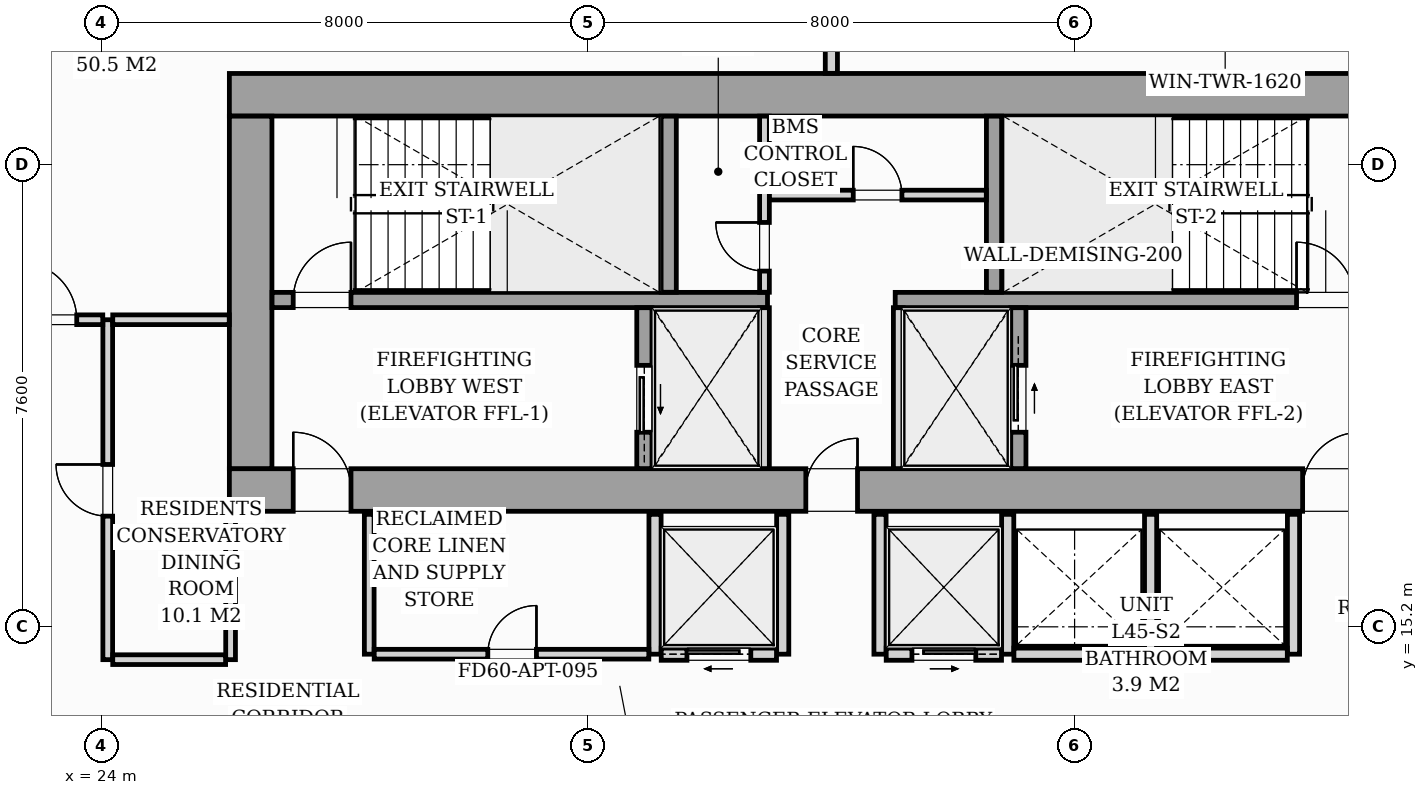
"""IFC4 building model, lengths in metres.
Left out: names, types, materials, properties, quantities, classifications, styles, units other than length and angle.
Written with IfcOpenShell. Run it as: python <this file> out.ifc"""

import sys

from ifc_helpers import new_model, si_unit, direction, frame, frame_2d, origin, origin_2d, place, context, subcontext, project, spatial, rectangle, i_section, extrude, source, transform, mapped, element, fill, save


model = new_model("IFC4")
c1 = context("Model", 3, precision=1e-05, world=origin(), true_north=direction((0.0, 1.0)))
c2 = subcontext(c1, "Body", "Model", "MODEL_VIEW")
j1 = project(units=[si_unit("LENGTHUNIT", "METRE"), si_unit("PLANEANGLEUNIT", "RADIAN")], contexts=[c1])
p1 = place(None, origin())
s1 = spatial("IfcSite", under=j1, at=p1, CompositionType="ELEMENT")
p2 = place(p1, origin())
s2 = spatial("IfcBuilding", under=s1, at=p2, CompositionType="ELEMENT")
p3 = place(p2, frame((0.0, 0.0, 156.6)))
s3 = spatial("IfcBuildingStorey", under=s2, at=p3, CompositionType="ELEMENT", Elevation=156.6)
m1 = source(origin(), c2, "Body", "SweptSolid", [
    extrude(i_section(OverallWidth=0.421, OverallDepth=0.465, WebThickness=0.045, FlangeThickness=0.073, FilletRadius=0.018, at=origin_2d()), origin(), (0.0, 0.0, 1.0), 3.196),
])
for number, where, z_axis, x_axis in (
    (1, (26.4, 17.4, 0.002), (0.0, 0.0, 1.0), (1.0, 0.0, 0.0)),
    (2, (33.12, 17.4, 0.002), (0.0, 0.0, 1.0), (1.0, 0.0, 0.0)),
    (3, (38.88, 17.4, 0.002), (0.0, 0.0, 1.0), (1.0, 0.0, 0.0)),
    (4, (26.4, 24.0, 0.002), (0.0, 0.0, 1.0), (1.0, 0.0, 0.0)),
    (5, (33.12, 24.0, 0.002), (0.0, 0.0, 1.0), (1.0, 0.0, 0.0)),
    (6, (38.88, 24.0, 0.002), (0.0, 0.0, 1.0), (1.0, 0.0, 0.0)),
):
    element("IfcColumn", number, at=place(p3, frame(where, z_axis=z_axis, x_axis=x_axis)), inside=s3, PredefinedType="PILASTER", context=c2, shape_type="MappedRepresentation", body=[
        mapped(m1, transform((0.0, 0.0, 0.0), scale=1.0)),
    ])
p4 = place(p3, frame((40.983, 25.727, 0.0), z_axis=(0.0, 0.0, 1.0), x_axis=(0.995395844771, -0.095849424686, 0.0)))
e7 = element("IfcWall", 7, at=p4, inside=s3, PredefinedType="STANDARD", context=c2, shape_type="SweptSolid", body=[
    extrude(rectangle(XDim=17.01, YDim=0.26, at=frame_2d((8.505, 0.0))), origin(), (0.0, 0.0, 1.0), 2.94),
])
p5 = place(p4, frame((11.56, 0.0, 0.0)))
e8 = element("IfcOpeningElement", 8, at=p5, cuts=e7, PredefinedType="OPENING", context=c2, shape_type="SweptSolid", body=[
    extrude(rectangle(XDim=1.8, YDim=2.06, at=frame_2d((0.9, 1.03))), frame((0.0, 0.14, 0.0), z_axis=(0.0, -1.0, 0.0), x_axis=(1.0, 0.0, 0.0)), (0.0, 0.0, 1.0), 0.28),
])
p6 = place(p4, frame((0.7, 0.0, 0.65)))
e9 = element("IfcOpeningElement", 9, at=p6, cuts=e7, PredefinedType="OPENING", context=c2, shape_type="SweptSolid", body=[
    extrude(rectangle(XDim=1.6, YDim=1.5, at=frame_2d((0.8, 0.75))), frame((0.0, 0.14, 0.0), z_axis=(0.0, -1.0, 0.0), x_axis=(1.0, 0.0, 0.0)), (0.0, 0.0, 1.0), 0.28),
])
p7 = place(p3, frame((26.1, 17.45, 0.0), z_axis=(0.0, 0.0, 1.0), x_axis=(1.0, 0.0, 0.0)))
e10 = element("IfcWall", 10, at=p7, inside=s3, PredefinedType="SHEAR", context=c2, shape_type="SweptSolid", body=[
    extrude(rectangle(XDim=19.8, YDim=0.7, at=frame_2d((9.9, 0.0))), origin(), (0.0, 0.0, 1.0), 3.2),
])
p8 = place(p7, frame((1.05, 0.0, 0.0)))
e11 = element("IfcOpeningElement", 11, at=p8, cuts=e10, PredefinedType="OPENING", context=c2, shape_type="SweptSolid", body=[
    extrude(rectangle(XDim=0.95, YDim=2.06, at=frame_2d((0.475, 1.03))), frame((0.0, 0.36, 0.0), z_axis=(0.0, -1.0, 0.0), x_axis=(1.0, 0.0, 0.0)), (0.0, 0.0, 1.0), 0.72),
])
p9 = place(p7, frame((9.48, 0.0, 0.0)))
e12 = element("IfcOpeningElement", 12, at=p9, cuts=e10, PredefinedType="OPENING", context=c2, shape_type="SweptSolid", body=[
    extrude(rectangle(XDim=0.85, YDim=2.0, at=frame_2d((0.425, 1.0))), frame((0.0, 0.36, 0.0), z_axis=(0.0, -1.0, 0.0), x_axis=(1.0, 0.0, 0.0)), (0.0, 0.0, 1.0), 0.72),
])
p10 = place(p7, frame((17.65, 0.0, 0.0)))
e13 = element("IfcOpeningElement", 13, at=p10, cuts=e10, PredefinedType="OPENING", context=c2, shape_type="SweptSolid", body=[
    extrude(rectangle(XDim=0.95, YDim=2.06, at=frame_2d((0.475, 1.03))), frame((0.0, 0.36, 0.0), z_axis=(0.0, -1.0, 0.0), x_axis=(1.0, 0.0, 0.0)), (0.0, 0.0, 1.0), 0.72),
])
p11 = place(p3, frame((26.1, 23.95, 0.0), z_axis=(0.0, 0.0, 1.0), x_axis=(1.0, 0.0, 0.0)))
e14 = element("IfcWall", 14, at=p11, inside=s3, PredefinedType="SHEAR", context=c2, shape_type="SweptSolid", body=[
    extrude(rectangle(XDim=19.8, YDim=0.7, at=frame_2d((9.9, 0.0))), origin(), (0.0, 0.0, 1.0), 3.2),
])
p12 = place(p3, frame((26.45, 17.802, 0.0), z_axis=(0.0, 0.0, 1.0), x_axis=(0.0, 1.0, 0.0)))
e15 = element("IfcWall", 15, at=p12, inside=s3, PredefinedType="SHEAR", context=c2, shape_type="SweptSolid", body=[
    extrude(rectangle(XDim=5.796, YDim=0.7, at=frame_2d((2.898, 0.0))), origin(), (0.0, 0.0, 1.0), 3.2),
])
p13 = place(p3, frame((26.802, 20.575, 0.0), z_axis=(0.0, 0.0, 1.0), x_axis=(1.0, 0.0, 0.0)))
e16 = element("IfcWall", 16, at=p13, inside=s3, PredefinedType="SOLIDWALL", context=c2, shape_type="SweptSolid", body=[
    extrude(rectangle(XDim=8.148, YDim=0.25, at=frame_2d((4.074, 0.0))), origin(), (0.0, 0.0, 1.0), 3.2),
])
p14 = place(p13, frame((0.348, 0.0, 0.0)))
e17 = element("IfcOpeningElement", 17, at=p14, cuts=e16, PredefinedType="OPENING", context=c2, shape_type="SweptSolid", body=[
    extrude(rectangle(XDim=0.95, YDim=2.06, at=frame_2d((0.475, 1.03))), frame((0.0, 0.135, 0.0), z_axis=(0.0, -1.0, 0.0), x_axis=(1.0, 0.0, 0.0)), (0.0, 0.0, 1.0), 0.27),
])
p15 = place(p3, frame((37.05, 20.575, 0.0), z_axis=(0.0, 0.0, 1.0), x_axis=(1.0, 0.0, 0.0)))
e18 = element("IfcWall", 18, at=p15, inside=s3, PredefinedType="SOLIDWALL", context=c2, shape_type="SweptSolid", body=[
    extrude(rectangle(XDim=8.148, YDim=0.25, at=frame_2d((4.074, 0.0))), origin(), (0.0, 0.0, 1.0), 3.2),
])
p16 = place(p15, frame((6.6, 0.0, 0.0)))
e19 = element("IfcOpeningElement", 19, at=p16, cuts=e18, PredefinedType="OPENING", context=c2, shape_type="SweptSolid", body=[
    extrude(rectangle(XDim=0.95, YDim=2.06, at=frame_2d((0.475, 1.03))), frame((0.0, 0.135, 0.0), z_axis=(0.0, -1.0, 0.0), x_axis=(1.0, 0.0, 0.0)), (0.0, 0.0, 1.0), 0.27),
])
for number, where, z_axis, x_axis in (
    (20, (33.325, 20.702, 0.0), (0.0, 0.0, 1.0), (0.0, 1.0, 0.0)),
    (21, (38.675, 20.702, 0.0), (0.0, 0.0, 1.0), (0.0, 1.0, 0.0)),
):
    element("IfcWall", number, at=place(p3, frame(where, z_axis=z_axis, x_axis=x_axis)), inside=s3, PredefinedType="SOLIDWALL", context=c2, shape_type="SweptSolid", body=[
        extrude(rectangle(XDim=2.896, YDim=0.25, at=frame_2d((1.448, 0.0))), origin(), (0.0, 0.0, 1.0), 3.2),
    ])
p17 = place(p3, frame((32.925, 17.802, 0.0), z_axis=(0.0, 0.0, 1.0), x_axis=(0.0, 1.0, 0.0)))
e22 = element("IfcWall", 22, at=p17, inside=s3, PredefinedType="SOLIDWALL", context=c2, shape_type="SweptSolid", body=[
    extrude(rectangle(XDim=2.646, YDim=0.25, at=frame_2d((1.323, 0.0))), origin(), (0.0, 0.0, 1.0), 3.2),
])
p18 = place(p17, frame((0.598, 0.0, 0.0)))
e23 = element("IfcOpeningElement", 23, at=p18, cuts=e22, PredefinedType="OPENING", context=c2, shape_type="SweptSolid", body=[
    extrude(rectangle(XDim=1.1, YDim=2.08, at=frame_2d((0.55, 1.04))), frame((0.0, 0.135, 0.0), z_axis=(0.0, -1.0, 0.0), x_axis=(1.0, 0.0, 0.0)), (0.0, 0.0, 1.0), 0.27),
])
for number, where, z_axis, x_axis in (
    (24, (34.9, 17.802, 0.0), (0.0, 0.0, 1.0), (0.0, 1.0, 0.0)),
    (25, (37.1, 17.802, 0.0), (0.0, 0.0, 1.0), (0.0, 1.0, 0.0)),
):
    element("IfcWall", number, at=place(p3, frame(where, z_axis=z_axis, x_axis=x_axis)), inside=s3, PredefinedType="PARTITIONING", context=c2, shape_type="SweptSolid", body=[
        extrude(rectangle(XDim=2.646, YDim=0.16, at=frame_2d((1.323, 0.0))), origin(), (0.0, 0.0, 1.0), 2.94),
    ])
p19 = place(p3, frame((39.075, 17.802, 0.0), z_axis=(0.0, 0.0, 1.0), x_axis=(0.0, 1.0, 0.0)))
e26 = element("IfcWall", 26, at=p19, inside=s3, PredefinedType="SOLIDWALL", context=c2, shape_type="SweptSolid", body=[
    extrude(rectangle(XDim=2.646, YDim=0.25, at=frame_2d((1.323, 0.0))), origin(), (0.0, 0.0, 1.0), 3.2),
])
p20 = place(p19, frame((0.598, 0.0, 0.0)))
e27 = element("IfcOpeningElement", 27, at=p20, cuts=e26, PredefinedType="OPENING", context=c2, shape_type="SweptSolid", body=[
    extrude(rectangle(XDim=1.1, YDim=2.08, at=frame_2d((0.55, 1.04))), frame((0.0, 0.135, 0.0), z_axis=(0.0, -1.0, 0.0), x_axis=(1.0, 0.0, 0.0)), (0.0, 0.0, 1.0), 0.27),
])
p21 = place(p3, frame((34.9, 20.702, 0.0), z_axis=(0.0, 0.0, 1.0), x_axis=(0.0, 1.0, 0.0)))
e28 = element("IfcWall", 28, at=p21, inside=s3, PredefinedType="PARTITIONING", context=c2, shape_type="SweptSolid", body=[
    extrude(rectangle(XDim=2.896, YDim=0.16, at=frame_2d((1.448, 0.0))), origin(), (0.0, 0.0, 1.0), 2.94),
])
p22 = place(p21, frame((0.348, 0.0, 0.0)))
e29 = element("IfcOpeningElement", 29, at=p22, cuts=e28, PredefinedType="OPENING", context=c2, shape_type="SweptSolid", body=[
    extrude(rectangle(XDim=0.8, YDim=2.05, at=frame_2d((0.4, 1.025))), frame((0.0, 0.09, 0.0), z_axis=(0.0, -1.0, 0.0), x_axis=(1.0, 0.0, 0.0)), (0.0, 0.0, 1.0), 0.18),
])
p23 = place(p3, frame((34.982, 22.3, 0.0), z_axis=(0.0, 0.0, 1.0), x_axis=(1.0, 0.0, 0.0)))
e30 = element("IfcWall", 30, at=p23, inside=s3, PredefinedType="PARTITIONING", context=c2, shape_type="SweptSolid", body=[
    extrude(rectangle(XDim=3.566, YDim=0.16, at=frame_2d((1.783, 0.0))), origin(), (0.0, 0.0, 1.0), 2.94),
])
p24 = place(p23, frame((1.378, 0.0, 0.0)))
e31 = element("IfcOpeningElement", 31, at=p24, cuts=e30, PredefinedType="OPENING", context=c2, shape_type="SweptSolid", body=[
    extrude(rectangle(XDim=0.8, YDim=2.05, at=frame_2d((0.4, 1.025))), frame((0.0, 0.09, 0.0), z_axis=(0.0, -1.0, 0.0), x_axis=(1.0, 0.0, 0.0)), (0.0, 0.0, 1.0), 0.18),
])
p25 = place(p3, frame((28.4, 14.75, 0.0), z_axis=(0.0, 0.0, 1.0), x_axis=(0.0, 1.0, 0.0)))
e32 = element("IfcWall", 32, at=p25, inside=s3, PredefinedType="PARTITIONING", context=c2, shape_type="SweptSolid", body=[
    extrude(rectangle(XDim=2.3, YDim=0.16, at=frame_2d((1.15, 0.0))), origin(), (0.0, 0.0, 1.0), 2.94),
])
p26 = place(p3, frame((33.1, 14.75, 0.0), z_axis=(0.0, 0.0, 1.0), x_axis=(0.0, 1.0, 0.0)))
e33 = element("IfcWall", 33, at=p26, inside=s3, PredefinedType="PARTITIONING", context=c2, shape_type="SweptSolid", body=[
    extrude(rectangle(XDim=2.3, YDim=0.2, at=frame_2d((1.15, 0.0))), origin(), (0.0, 0.0, 1.0), 2.94),
])
p27 = place(p3, frame((28.482, 14.75, 0.0), z_axis=(0.0, 0.0, 1.0), x_axis=(1.0, 0.0, 0.0)))
e34 = element("IfcWall", 34, at=p27, inside=s3, PredefinedType="PARTITIONING", context=c2, shape_type="SweptSolid", body=[
    extrude(rectangle(XDim=4.516, YDim=0.16, at=frame_2d((2.258, 0.0))), origin(), (0.0, 0.0, 1.0), 2.94),
])
p28 = place(p27, frame((1.868, 0.0, 0.0)))
e35 = element("IfcOpeningElement", 35, at=p28, cuts=e34, PredefinedType="OPENING", context=c2, shape_type="SweptSolid", body=[
    extrude(rectangle(XDim=0.8, YDim=2.05, at=frame_2d((0.4, 1.025))), frame((0.0, 0.09, 0.0), z_axis=(0.0, -1.0, 0.0), x_axis=(1.0, 0.0, 0.0)), (0.0, 0.0, 1.0), 0.18),
])
p29 = place(p3, frame((35.2, 14.75, 0.0), z_axis=(0.0, 0.0, 1.0), x_axis=(0.0, 1.0, 0.0)))
e36 = element("IfcWall", 36, at=p29, inside=s3, PredefinedType="PARTITIONING", context=c2, shape_type="SweptSolid", body=[
    extrude(rectangle(XDim=2.3, YDim=0.2, at=frame_2d((1.15, 0.0))), origin(), (0.0, 0.0, 1.0), 2.94),
])
p30 = place(p3, frame((33.202, 14.75, 0.0), z_axis=(0.0, 0.0, 1.0), x_axis=(1.0, 0.0, 0.0)))
e37 = element("IfcWall", 37, at=p30, inside=s3, PredefinedType="PARTITIONING", context=c2, shape_type="SweptSolid", body=[
    extrude(rectangle(XDim=1.896, YDim=0.2, at=frame_2d((0.948, 0.0))), origin(), (0.0, 0.0, 1.0), 2.94),
])
p31 = place(p30, frame((0.423, 0.0, 0.0)))
e38 = element("IfcOpeningElement", 38, at=p31, cuts=e37, PredefinedType="OPENING", context=c2, shape_type="SweptSolid", body=[
    extrude(rectangle(XDim=1.05, YDim=2.08, at=frame_2d((0.525, 1.04))), frame((0.0, 0.11, 0.0), z_axis=(0.0, -1.0, 0.0), x_axis=(1.0, 0.0, 0.0)), (0.0, 0.0, 1.0), 0.22),
])
for number, where, z_axis, x_axis in (
    (39, (36.8, 14.75, 0.0), (0.0, 0.0, 1.0), (0.0, 1.0, 0.0)),
    (40, (38.9, 14.75, 0.0), (0.0, 0.0, 1.0), (0.0, 1.0, 0.0)),
):
    element("IfcWall", number, at=place(p3, frame(where, z_axis=z_axis, x_axis=x_axis)), inside=s3, PredefinedType="PARTITIONING", context=c2, shape_type="SweptSolid", body=[
        extrude(rectangle(XDim=2.3, YDim=0.2, at=frame_2d((1.15, 0.0))), origin(), (0.0, 0.0, 1.0), 2.94),
    ])
p32 = place(p3, frame((36.902, 14.75, 0.0), z_axis=(0.0, 0.0, 1.0), x_axis=(1.0, 0.0, 0.0)))
e41 = element("IfcWall", 41, at=p32, inside=s3, PredefinedType="PARTITIONING", context=c2, shape_type="SweptSolid", body=[
    extrude(rectangle(XDim=1.896, YDim=0.2, at=frame_2d((0.948, 0.0))), origin(), (0.0, 0.0, 1.0), 2.94),
])
p33 = place(p32, frame((0.423, 0.0, 0.0)))
e42 = element("IfcOpeningElement", 42, at=p33, cuts=e41, PredefinedType="OPENING", context=c2, shape_type="SweptSolid", body=[
    extrude(rectangle(XDim=1.05, YDim=2.08, at=frame_2d((0.525, 1.04))), frame((0.0, 0.11, 0.0), z_axis=(0.0, -1.0, 0.0), x_axis=(1.0, 0.0, 0.0)), (0.0, 0.0, 1.0), 0.22),
])
for number, where, z_axis, x_axis in (
    (43, (41.25, 14.75, 0.0), (0.0, 0.0, 1.0), (0.0, 1.0, 0.0)),
    (44, (43.6, 14.75, 0.0), (0.0, 0.0, 1.0), (0.0, 1.0, 0.0)),
):
    element("IfcWall", number, at=place(p3, frame(where, z_axis=z_axis, x_axis=x_axis)), inside=s3, PredefinedType="PARTITIONING", context=c2, shape_type="SweptSolid", body=[
        extrude(rectangle(XDim=2.3, YDim=0.2, at=frame_2d((1.15, 0.0))), origin(), (0.0, 0.0, 1.0), 2.94),
    ])
for number, where, z_axis, x_axis in (
    (45, (39.002, 14.75, 0.0), (0.0, 0.0, 1.0), (1.0, 0.0, 0.0)),
    (46, (41.352, 14.75, 0.0), (0.0, 0.0, 1.0), (1.0, 0.0, 0.0)),
):
    element("IfcWall", number, at=place(p3, frame(where, z_axis=z_axis, x_axis=x_axis)), inside=s3, PredefinedType="PARTITIONING", context=c2, shape_type="SweptSolid", body=[
        extrude(rectangle(XDim=2.146, YDim=0.2, at=frame_2d((1.073, 0.0))), origin(), (0.0, 0.0, 1.0), 2.94),
    ])
p34 = place(p3, frame((36.0, 24.302, 0.0), z_axis=(0.0, 0.0, 1.0), x_axis=(0.0, 1.0, 0.0)))
e47 = element("IfcWall", 47, at=p34, inside=s3, PredefinedType="PARTITIONING", context=c2, shape_type="SweptSolid", body=[
    extrude(rectangle(XDim=1.955, YDim=0.2, at=frame_2d((0.978, 0.0))), origin(), (0.0, 0.0, 1.0), 2.94),
])
p35 = place(p3, frame((24.1, 14.66, 0.0), z_axis=(0.0, 0.0, 1.0), x_axis=(0.0, 1.0, 0.0)))
e48 = element("IfcWall", 48, at=p35, inside=s3, PredefinedType="PARTITIONING", context=c2, shape_type="SweptSolid", body=[
    extrude(rectangle(XDim=5.59, YDim=0.16, at=frame_2d((2.795, 0.0))), origin(), (0.0, 0.0, 1.0), 2.94),
])
p36 = place(p35, frame((2.36, 0.0, 0.0)))
e49 = element("IfcOpeningElement", 49, at=p36, cuts=e48, PredefinedType="OPENING", context=c2, shape_type="SweptSolid", body=[
    extrude(rectangle(XDim=0.85, YDim=2.0, at=frame_2d((0.425, 1.0))), frame((0.0, 0.09, 0.0), z_axis=(0.0, -1.0, 0.0), x_axis=(1.0, 0.0, 0.0)), (0.0, 0.0, 1.0), 0.18),
])
p37 = place(p3, frame((22.132, 20.25, 0.0), z_axis=(0.0, 0.0, 1.0), x_axis=(1.0, 0.0, 0.0)))
e50 = element("IfcWall", 50, at=p37, inside=s3, PredefinedType="PARTITIONING", context=c2, shape_type="SweptSolid", body=[
    extrude(rectangle(XDim=1.886, YDim=0.16, at=frame_2d((0.943, 0.0))), origin(), (0.0, 0.0, 1.0), 2.94),
])
p38 = place(p37, frame((0.508, 0.0, 0.0)))
e51 = element("IfcOpeningElement", 51, at=p38, cuts=e50, PredefinedType="OPENING", context=c2, shape_type="SweptSolid", body=[
    extrude(rectangle(XDim=0.95, YDim=2.06, at=frame_2d((0.475, 1.03))), frame((0.0, 0.09, 0.0), z_axis=(0.0, -1.0, 0.0), x_axis=(1.0, 0.0, 0.0)), (0.0, 0.0, 1.0), 0.18),
])
p39 = place(p3, frame((24.182, 20.25, 0.0), z_axis=(0.0, 0.0, 1.0), x_axis=(1.0, 0.0, 0.0)))
e52 = element("IfcWall", 52, at=p39, inside=s3, PredefinedType="PARTITIONING", context=c2, shape_type="SweptSolid", body=[
    extrude(rectangle(XDim=1.916, YDim=0.16, at=frame_2d((0.958, 0.0))), origin(), (0.0, 0.0, 1.0), 2.94),
])
p40 = place(p3, frame((26.12, 14.66, 0.0), z_axis=(0.0, 0.0, 1.0), x_axis=(0.0, 1.0, 0.0)))
e53 = element("IfcWall", 53, at=p40, inside=s3, PredefinedType="PARTITIONING", context=c2, shape_type="SweptSolid", body=[
    extrude(rectangle(XDim=2.438, YDim=0.16, at=frame_2d((1.219, 0.0))), origin(), (0.0, 0.0, 1.0), 2.94),
])
p41 = place(p3, frame((24.182, 14.66, 0.0), z_axis=(0.0, 0.0, 1.0), x_axis=(1.0, 0.0, 0.0)))
e54 = element("IfcWall", 54, at=p41, inside=s3, PredefinedType="PARTITIONING", context=c2, shape_type="SweptSolid", body=[
    extrude(rectangle(XDim=1.856, YDim=0.16, at=frame_2d((0.928, 0.0))), origin(), (0.0, 0.0, 1.0), 2.94),
])
m2 = source(origin(), c2, "Body", "SweptSolid", [
    extrude(rectangle(XDim=0.95, YDim=2.06, at=frame_2d((0.475, 1.03))), frame((0.0, 0.025, 0.0), z_axis=(0.0, -1.0, 0.0), x_axis=(1.0, 0.0, 0.0)), (0.0, 0.0, 1.0), 0.05),
])
p42 = place(p8, origin())
e55 = element("IfcDoor", 55, at=p42, inside=s3, OperationType="SINGLE_SWING_LEFT", PredefinedType="DOOR", context=c2, shape_type="MappedRepresentation", body=[
    mapped(m2, transform((0.0, 0.0, 0.0), scale=1.0)),
])
fill(e11, e55)
m3 = source(origin(), c2, "Body", "SweptSolid", [
    extrude(rectangle(XDim=0.85, YDim=2.0, at=frame_2d((0.425, 1.0))), frame((0.0, 0.025, 0.0), z_axis=(0.0, -1.0, 0.0), x_axis=(1.0, 0.0, 0.0)), (0.0, 0.0, 1.0), 0.05),
])
p43 = place(p9, origin())
e56 = element("IfcDoor", 56, at=p43, inside=s3, OperationType="SINGLE_SWING_RIGHT", PredefinedType="DOOR", context=c2, shape_type="MappedRepresentation", body=[
    mapped(m3, transform((0.0, 0.0, 0.0), scale=1.0)),
])
fill(e12, e56)
p44 = place(p10, origin())
e57 = element("IfcDoor", 57, at=p44, inside=s3, OperationType="SINGLE_SWING_RIGHT", PredefinedType="DOOR", context=c2, shape_type="MappedRepresentation", body=[
    mapped(m2, transform((0.0, 0.0, 0.0), scale=1.0)),
])
fill(e13, e57)
p45 = place(p14, origin())
e58 = element("IfcDoor", 58, at=p45, inside=s3, OperationType="SINGLE_SWING_RIGHT", PredefinedType="DOOR", context=c2, shape_type="MappedRepresentation", body=[
    mapped(m2, transform((0.0, 0.0, 0.0), scale=1.0)),
])
fill(e17, e58)
p46 = place(p16, origin())
e59 = element("IfcDoor", 59, at=p46, inside=s3, OperationType="SINGLE_SWING_LEFT", PredefinedType="DOOR", context=c2, shape_type="MappedRepresentation", body=[
    mapped(m2, transform((0.0, 0.0, 0.0), scale=1.0)),
])
fill(e19, e59)
m4 = source(origin(), c2, "Body", "SweptSolid", [
    extrude(rectangle(XDim=1.1, YDim=2.08, at=frame_2d((0.55, 1.04))), frame((0.0, 0.025, 0.0), z_axis=(0.0, -1.0, 0.0), x_axis=(1.0, 0.0, 0.0)), (0.0, 0.0, 1.0), 0.05),
])
p47 = place(p18, origin())
e60 = element("IfcDoor", 60, at=p47, inside=s3, OperationType="SLIDING_TO_LEFT", PredefinedType="DOOR", context=c2, shape_type="MappedRepresentation", body=[
    mapped(m4, transform((0.0, 0.0, 0.0), scale=1.0)),
])
fill(e23, e60)
p48 = place(p20, origin())
e61 = element("IfcDoor", 61, at=p48, inside=s3, OperationType="SLIDING_TO_RIGHT", PredefinedType="DOOR", context=c2, shape_type="MappedRepresentation", body=[
    mapped(m4, transform((0.0, 0.0, 0.0), scale=1.0)),
])
fill(e27, e61)
m5 = source(origin(), c2, "Body", "SweptSolid", [
    extrude(rectangle(XDim=0.8, YDim=2.05, at=frame_2d((0.4, 1.025))), frame((0.0, 0.025, 0.0), z_axis=(0.0, -1.0, 0.0), x_axis=(1.0, 0.0, 0.0)), (0.0, 0.0, 1.0), 0.05),
])
p49 = place(p22, origin())
e62 = element("IfcDoor", 62, at=p49, inside=s3, OperationType="SINGLE_SWING_RIGHT", PredefinedType="DOOR", context=c2, shape_type="MappedRepresentation", body=[
    mapped(m5, transform((0.0, 0.0, 0.0), scale=1.0)),
])
fill(e29, e62)
p50 = place(p24, origin())
e63 = element("IfcDoor", 63, at=p50, inside=s3, OperationType="SINGLE_SWING_LEFT", PredefinedType="DOOR", context=c2, shape_type="MappedRepresentation", body=[
    mapped(m5, transform((0.0, 0.0, 0.0), scale=1.0)),
])
fill(e31, e63)
p51 = place(p28, origin())
e64 = element("IfcDoor", 64, at=p51, inside=s3, OperationType="SINGLE_SWING_RIGHT", PredefinedType="DOOR", context=c2, shape_type="MappedRepresentation", body=[
    mapped(m5, transform((0.0, 0.0, 0.0), scale=1.0)),
])
fill(e35, e64)
m6 = source(origin(), c2, "Body", "SweptSolid", [
    extrude(rectangle(XDim=1.05, YDim=2.08, at=frame_2d((0.525, 1.04))), frame((0.0, 0.025, 0.0), z_axis=(0.0, -1.0, 0.0), x_axis=(1.0, 0.0, 0.0)), (0.0, 0.0, 1.0), 0.05),
])
p52 = place(p31, origin())
e65 = element("IfcDoor", 65, at=p52, inside=s3, OperationType="SLIDING_TO_LEFT", PredefinedType="DOOR", context=c2, shape_type="MappedRepresentation", body=[
    mapped(m6, transform((0.0, 0.0, 0.0), scale=1.0)),
])
fill(e38, e65)
p53 = place(p33, origin())
e66 = element("IfcDoor", 66, at=p53, inside=s3, OperationType="SLIDING_TO_RIGHT", PredefinedType="DOOR", context=c2, shape_type="MappedRepresentation", body=[
    mapped(m6, transform((0.0, 0.0, 0.0), scale=1.0)),
])
fill(e42, e66)
p54 = place(p36, origin())
e67 = element("IfcDoor", 67, at=p54, inside=s3, OperationType="SINGLE_SWING_RIGHT", PredefinedType="DOOR", context=c2, shape_type="MappedRepresentation", body=[
    mapped(m3, transform((0.0, 0.0, 0.0), scale=1.0)),
])
fill(e49, e67)
m7 = source(origin(), c2, "Body", "SweptSolid", [
    extrude(rectangle(XDim=0.95, YDim=2.06, at=frame_2d((0.475, 1.03))), frame((0.0, 0.025, 0.0), z_axis=(0.0, -1.0, 0.0), x_axis=(1.0, 0.0, 0.0)), (0.0, 0.0, 1.0), 0.05),
])
p55 = place(p38, origin())
e68 = element("IfcDoor", 68, at=p55, inside=s3, OperationType="SINGLE_SWING_LEFT", PredefinedType="DOOR", context=c2, shape_type="MappedRepresentation", body=[
    mapped(m7, transform((0.0, 0.0, 0.0), scale=1.0)),
])
fill(e51, e68)
save(model, sys.argv[1])
